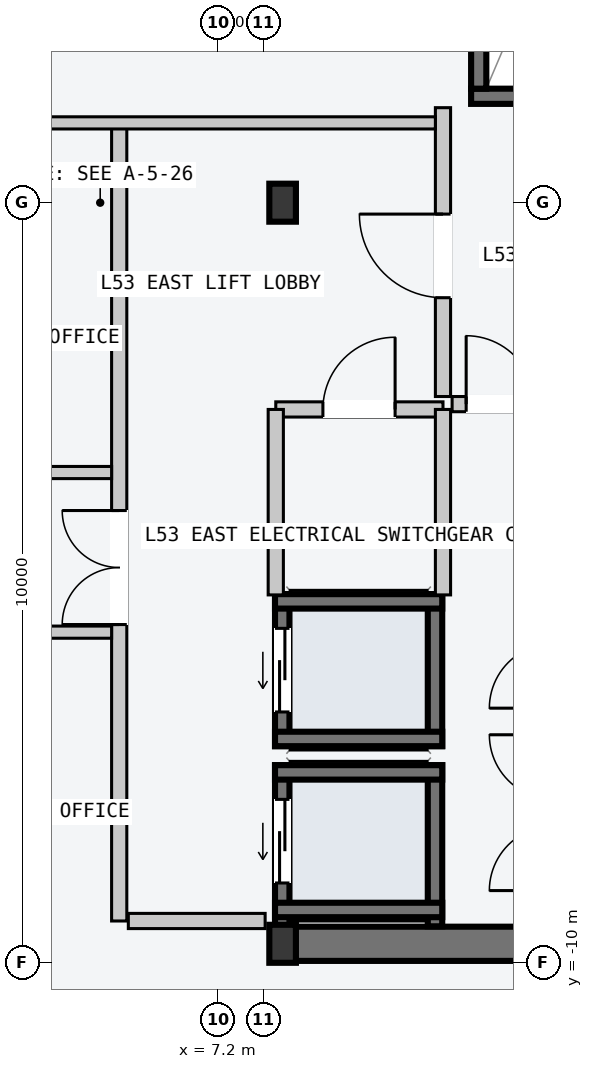
"""IFC4 building model, lengths in metres.
Left out: names, types, materials, properties, quantities, classifications, styles, units other than length and angle.
Written with IfcOpenShell. Run it as: python <this file> out.ifc"""

import sys

from ifc_helpers import new_model, si_unit, direction, frame, frame_2d, origin, origin_2d, place, context, subcontext, project, spatial, rectangle, i_section, extrude, element, fill, save


model = new_model("IFC4")
c1 = context("Model", 3, precision=1e-05, world=origin(), true_north=direction((0.0, 1.0)))
c2 = subcontext(c1, "Body", "Model", "MODEL_VIEW")
j1 = project(units=[si_unit("LENGTHUNIT", "METRE"), si_unit("PLANEANGLEUNIT", "RADIAN")], contexts=[c1])
p1 = place(None, origin())
s1 = spatial("IfcSite", under=j1, at=p1, CompositionType="ELEMENT")
p2 = place(p1, origin())
s2 = spatial("IfcBuilding", under=s1, at=p2, CompositionType="ELEMENT")
p3 = place(p2, frame((0.0, 0.0, 201.9)))
s3 = spatial("IfcBuildingStorey", under=s2, at=p3, CompositionType="ELEMENT", Elevation=201.9)
p4 = place(p3, frame((8.07, -9.75, -0.2), z_axis=(0.0, 0.0, 1.0), x_axis=(1.0, 0.0, 0.0)))
e1 = element("IfcWall", 1, at=p4, inside=s3, PredefinedType="SHEAR", context=c2, shape_type="SweptSolid", body=[
    extrude(rectangle(XDim=6.46, YDim=0.45, at=frame_2d((3.23, 0.0))), origin(), (0.0, 0.0, 1.0), 3.6),
])
p5 = place(p3, frame((10.53, 1.4, -0.2), z_axis=(0.0, 0.0, 1.0), x_axis=(1.0, 0.0, 0.0)))
e2 = element("IfcWall", 2, at=p5, inside=s3, PredefinedType="SOLIDWALL", context=c2, shape_type="SweptSolid", body=[
    extrude(rectangle(XDim=3.72, YDim=0.2, at=frame_2d((1.86, 0.0))), origin(), (0.0, 0.0, 1.0), 3.6),
])
p6 = place(p5, frame((1.5, 0.0, 0.2)))
e3 = element("IfcOpeningElement", 3, at=p6, cuts=e2, PredefinedType="OPENING", context=c2, shape_type="SweptSolid", body=[
    extrude(rectangle(XDim=1.12, YDim=2.18, at=frame_2d((0.56, 1.09))), frame((0.0, 0.11, 0.0), z_axis=(0.0, -1.0, 0.0), x_axis=(1.0, 0.0, 0.0)), (0.0, 0.0, 1.0), 0.22),
])
p7 = place(p3, frame((10.63, 1.5, -0.2), z_axis=(0.0, 0.0, 1.0), x_axis=(0.0, 1.0, 0.0)))
e4 = element("IfcWall", 4, at=p7, inside=s3, PredefinedType="SOLIDWALL", context=c2, shape_type="SweptSolid", body=[
    extrude(rectangle(XDim=7.8, YDim=0.2, at=frame_2d((3.9, 0.0))), origin(), (0.0, 0.0, 1.0), 3.6),
])
for number, where, z_axis, x_axis in (
    (5, (8.05, -9.75, 0.0), (0.0, 0.0, 1.0), (1.0, 0.0, 0.0)),
    (6, (8.05, 0.0, 0.0), (0.0, 0.0, 1.0), (1.0, 0.0, 0.0)),
):
    element("IfcColumn", number, at=place(p3, frame(where, z_axis=z_axis, x_axis=x_axis)), inside=s3, PredefinedType="COLUMN", context=c2, shape_type="SweptSolid", body=[
        extrude(i_section(OverallWidth=0.35, OverallDepth=0.5, WebThickness=0.02, FlangeThickness=0.032, at=origin_2d()), origin(), (0.0, 0.0, 1.0), 3.6),
    ])
p8 = place(p3, frame((8.045, -9.52, -0.2), z_axis=(0.0, 0.0, 1.0), x_axis=(0.0, 1.0, 0.0)))
e7 = element("IfcWall", 7, at=p8, inside=s3, PredefinedType="SOLIDWALL", context=c2, shape_type="SweptSolid", body=[
    extrude(rectangle(XDim=2.12, YDim=0.19, at=frame_2d((1.06, 0.0))), origin(), (0.0, 0.0, 1.0), 3.6),
])
p9 = place(p8, frame((0.57, 0.0, 0.2)))
e8 = element("IfcOpeningElement", 8, at=p9, cuts=e7, PredefinedType="OPENING", context=c2, shape_type="SweptSolid", body=[
    extrude(rectangle(XDim=1.1, YDim=2.2, at=frame_2d((0.55, 1.1))), frame((0.0, 0.105, 0.0), z_axis=(0.0, -1.0, 0.0), x_axis=(1.0, 0.0, 0.0)), (0.0, 0.0, 1.0), 0.21),
])
p10 = place(p3, frame((10.055, -9.52, -0.2), z_axis=(0.0, 0.0, 1.0), x_axis=(0.0, 1.0, 0.0)))
e9 = element("IfcWall", 9, at=p10, inside=s3, PredefinedType="SOLIDWALL", context=c2, shape_type="SweptSolid", body=[
    extrude(rectangle(XDim=2.12, YDim=0.19, at=frame_2d((1.06, 0.0))), origin(), (0.0, 0.0, 1.0), 3.6),
])
for number, where, z_axis, x_axis in (
    (10, (7.95, -7.495, -0.2), (0.0, 0.0, 1.0), (1.0, 0.0, 0.0)),
    (11, (7.95, -9.305, -0.2), (0.0, 0.0, 1.0), (1.0, 0.0, 0.0)),
):
    element("IfcWall", number, at=place(p3, frame(where, z_axis=z_axis, x_axis=x_axis)), inside=s3, PredefinedType="SOLIDWALL", context=c2, shape_type="SweptSolid", body=[
        extrude(rectangle(XDim=2.2, YDim=0.19, at=frame_2d((1.1, 0.0))), origin(), (0.0, 0.0, 1.0), 3.6),
    ])
p11 = place(p3, frame((8.045, -7.15, -0.2), z_axis=(0.0, 0.0, 1.0), x_axis=(0.0, 1.0, 0.0)))
e12 = element("IfcWall", 12, at=p11, inside=s3, PredefinedType="SOLIDWALL", context=c2, shape_type="SweptSolid", body=[
    extrude(rectangle(XDim=2.0, YDim=0.19, at=frame_2d((1.0, 0.0))), origin(), (0.0, 0.0, 1.0), 3.6),
])
p12 = place(p11, frame((0.45, 0.0, 0.2)))
e13 = element("IfcOpeningElement", 13, at=p12, cuts=e12, PredefinedType="OPENING", context=c2, shape_type="SweptSolid", body=[
    extrude(rectangle(XDim=1.1, YDim=2.2, at=frame_2d((0.55, 1.1))), frame((0.0, 0.105, 0.0), z_axis=(0.0, -1.0, 0.0), x_axis=(1.0, 0.0, 0.0)), (0.0, 0.0, 1.0), 0.21),
])
p13 = place(p3, frame((10.055, -7.15, -0.2), z_axis=(0.0, 0.0, 1.0), x_axis=(0.0, 1.0, 0.0)))
e14 = element("IfcWall", 14, at=p13, inside=s3, PredefinedType="SOLIDWALL", context=c2, shape_type="SweptSolid", body=[
    extrude(rectangle(XDim=2.0, YDim=0.19, at=frame_2d((1.0, 0.0))), origin(), (0.0, 0.0, 1.0), 3.6),
])
for number, where, z_axis, x_axis in (
    (15, (7.95, -5.245, -0.2), (0.0, 0.0, 1.0), (1.0, 0.0, 0.0)),
    (16, (7.95, -7.055, -0.2), (0.0, 0.0, 1.0), (1.0, 0.0, 0.0)),
):
    element("IfcWall", number, at=place(p3, frame(where, z_axis=z_axis, x_axis=x_axis)), inside=s3, PredefinedType="SOLIDWALL", context=c2, shape_type="SweptSolid", body=[
        extrude(rectangle(XDim=2.2, YDim=0.19, at=frame_2d((1.1, 0.0))), origin(), (0.0, 0.0, 1.0), 3.6),
    ])
p14 = place(p3, frame((5.9, -9.45, 0.0), z_axis=(0.0, 0.0, 1.0), x_axis=(0.0, 1.0, 0.0)))
e17 = element("IfcWall", 17, at=p14, inside=s3, PredefinedType="PARTITIONING", context=c2, shape_type="SweptSolid", body=[
    extrude(rectangle(XDim=10.5, YDim=0.2, at=frame_2d((5.25, 0.0))), origin(), (0.0, 0.0, 1.0), 3.4),
])
p15 = place(p14, frame((3.9, 0.0, 0.0)))
e18 = element("IfcOpeningElement", 18, at=p15, cuts=e17, PredefinedType="OPENING", context=c2, shape_type="SweptSolid", body=[
    extrude(rectangle(XDim=1.5, YDim=2.2, at=frame_2d((0.75, 1.1))), frame((0.0, 0.11, 0.0), z_axis=(0.0, -1.0, 0.0), x_axis=(1.0, 0.0, 0.0)), (0.0, 0.0, 1.0), 0.22),
])
p16 = place(p3, frame((6.02, -9.45, 0.0), z_axis=(0.0, 0.0, 1.0), x_axis=(1.0, 0.0, 0.0)))
e19 = element("IfcWall", 19, at=p16, inside=s3, PredefinedType="PARTITIONING", context=c2, shape_type="SweptSolid", body=[
    extrude(rectangle(XDim=1.8, YDim=0.2, at=frame_2d((0.9, 0.0))), origin(), (0.0, 0.0, 1.0), 3.4),
])
p17 = place(p3, frame((10.16, -2.55, 0.0), z_axis=(0.0, 0.0, 1.0), x_axis=(0.0, 1.0, 0.0)))
e20 = element("IfcWall", 20, at=p17, inside=s3, PredefinedType="PARTITIONING", context=c2, shape_type="SweptSolid", body=[
    extrude(rectangle(XDim=3.8, YDim=0.2, at=frame_2d((1.9, 0.0))), origin(), (0.0, 0.0, 1.0), 3.4),
])
p18 = place(p17, frame((1.3, 0.0, 0.0)))
e21 = element("IfcOpeningElement", 21, at=p18, cuts=e20, PredefinedType="OPENING", context=c2, shape_type="SweptSolid", body=[
    extrude(rectangle(XDim=1.1, YDim=2.15, at=frame_2d((0.55, 1.075))), frame((0.0, 0.11, 0.0), z_axis=(0.0, -1.0, 0.0), x_axis=(1.0, 0.0, 0.0)), (0.0, 0.0, 1.0), 0.22),
])
p19 = place(p3, frame((10.28, -2.65, 0.0), z_axis=(0.0, 0.0, 1.0), x_axis=(1.0, 0.0, 0.0)))
e22 = element("IfcWall", 22, at=p19, inside=s3, PredefinedType="PARTITIONING", context=c2, shape_type="SweptSolid", body=[
    extrude(rectangle(XDim=1.27, YDim=0.2, at=frame_2d((0.635, 0.0))), origin(), (0.0, 0.0, 1.0), 3.4),
])
p20 = place(p19, frame((0.185, 0.0, 0.0)))
e23 = element("IfcOpeningElement", 23, at=p20, cuts=e22, PredefinedType="OPENING", context=c2, shape_type="SweptSolid", body=[
    extrude(rectangle(XDim=0.9, YDim=2.15, at=frame_2d((0.45, 1.075))), frame((0.0, 0.11, 0.0), z_axis=(0.0, -1.0, 0.0), x_axis=(1.0, 0.0, 0.0)), (0.0, 0.0, 1.0), 0.22),
])
p21 = place(p3, frame((7.96, -2.72, 0.0), z_axis=(0.0, 0.0, 1.0), x_axis=(1.0, 0.0, 0.0)))
e24 = element("IfcWall", 24, at=p21, inside=s3, PredefinedType="PARTITIONING", context=c2, shape_type="SweptSolid", body=[
    extrude(rectangle(XDim=2.2, YDim=0.2, at=frame_2d((1.1, 0.0))), origin(), (0.0, 0.0, 1.0), 3.4),
])
p22 = place(p21, frame((0.62, 0.0, 0.0)))
e25 = element("IfcOpeningElement", 25, at=p22, cuts=e24, PredefinedType="OPENING", context=c2, shape_type="SweptSolid", body=[
    extrude(rectangle(XDim=0.95, YDim=2.1, at=frame_2d((0.475, 1.05))), frame((0.0, 0.11, 0.0), z_axis=(0.0, -1.0, 0.0), x_axis=(1.0, 0.0, 0.0)), (0.0, 0.0, 1.0), 0.22),
])
for number, where, z_axis, x_axis in (
    (26, (7.96, -5.16, 0.0), (0.0, 0.0, 1.0), (0.0, 1.0, 0.0)),
    (27, (10.16, -5.16, 0.0), (0.0, 0.0, 1.0), (0.0, 1.0, 0.0)),
):
    element("IfcWall", number, at=place(p3, frame(where, z_axis=z_axis, x_axis=x_axis)), inside=s3, PredefinedType="PARTITIONING", context=c2, shape_type="SweptSolid", body=[
        extrude(rectangle(XDim=2.44, YDim=0.2, at=frame_2d((1.22, 0.0))), origin(), (0.0, 0.0, 1.0), 3.4),
    ])
p23 = place(p3, frame((1.26, 1.05, 0.0), z_axis=(0.0, 0.0, 1.0), x_axis=(1.0, 0.0, 0.0)))
e28 = element("IfcWall", 28, at=p23, inside=s3, PredefinedType="PARTITIONING", context=c2, shape_type="SweptSolid", body=[
    extrude(rectangle(XDim=8.8, YDim=0.16, at=frame_2d((4.4, 0.0))), origin(), (0.0, 0.0, 1.0), 3.4),
])
for number, where, z_axis, x_axis in (
    (29, (1.26, -3.55, 0.0), (0.0, 0.0, 1.0), (1.0, 0.0, 0.0)),
    (30, (1.26, -5.65, 0.0), (0.0, 0.0, 1.0), (1.0, 0.0, 0.0)),
):
    element("IfcWall", number, at=place(p3, frame(where, z_axis=z_axis, x_axis=x_axis)), inside=s3, PredefinedType="PARTITIONING", context=c2, shape_type="SweptSolid", body=[
        extrude(rectangle(XDim=4.54, YDim=0.16, at=frame_2d((2.27, 0.0))), origin(), (0.0, 0.0, 1.0), 3.4),
    ])
p24 = place(p9, origin())
e31 = element("IfcDoor", 31, at=p24, inside=s3, OperationType="SLIDING_TO_LEFT", PredefinedType="DOOR", context=c2, shape_type="SweptSolid", body=[
    extrude(rectangle(XDim=1.1, YDim=2.2, at=frame_2d((0.55, 1.1))), frame((0.0, 0.025, 0.0), z_axis=(0.0, -1.0, 0.0), x_axis=(1.0, 0.0, 0.0)), (0.0, 0.0, 1.0), 0.05),
])
fill(e8, e31)
p25 = place(p12, origin())
e32 = element("IfcDoor", 32, at=p25, inside=s3, OperationType="SLIDING_TO_LEFT", PredefinedType="DOOR", context=c2, shape_type="SweptSolid", body=[
    extrude(rectangle(XDim=1.1, YDim=2.2, at=frame_2d((0.55, 1.1))), frame((0.0, 0.025, 0.0), z_axis=(0.0, -1.0, 0.0), x_axis=(1.0, 0.0, 0.0)), (0.0, 0.0, 1.0), 0.05),
])
fill(e13, e32)
p26 = place(p15, origin())
e33 = element("IfcDoor", 33, at=p26, inside=s3, OperationType="DOUBLE_DOOR_SINGLE_SWING", PredefinedType="DOOR", context=c2, shape_type="SweptSolid", body=[
    extrude(rectangle(XDim=1.5, YDim=2.2, at=frame_2d((0.75, 1.1))), frame((0.0, 0.025, 0.0), z_axis=(0.0, -1.0, 0.0), x_axis=(1.0, 0.0, 0.0)), (0.0, 0.0, 1.0), 0.05),
])
fill(e18, e33)
p27 = place(p18, origin())
e34 = element("IfcDoor", 34, at=p27, inside=s3, OperationType="SINGLE_SWING_RIGHT", PredefinedType="DOOR", context=c2, shape_type="SweptSolid", body=[
    extrude(rectangle(XDim=1.1, YDim=2.15, at=frame_2d((0.55, 1.075))), frame((0.0, 0.025, 0.0), z_axis=(0.0, -1.0, 0.0), x_axis=(1.0, 0.0, 0.0)), (0.0, 0.0, 1.0), 0.05),
])
fill(e21, e34)
p28 = place(p20, origin())
e35 = element("IfcDoor", 35, at=p28, inside=s3, OperationType="SINGLE_SWING_LEFT", PredefinedType="DOOR", context=c2, shape_type="SweptSolid", body=[
    extrude(rectangle(XDim=0.9, YDim=2.15, at=frame_2d((0.45, 1.075))), frame((0.0, 0.025, 0.0), z_axis=(0.0, -1.0, 0.0), x_axis=(1.0, 0.0, 0.0)), (0.0, 0.0, 1.0), 0.05),
])
fill(e23, e35)
p29 = place(p22, origin())
e36 = element("IfcDoor", 36, at=p29, inside=s3, OperationType="SINGLE_SWING_RIGHT", PredefinedType="DOOR", context=c2, shape_type="SweptSolid", body=[
    extrude(rectangle(XDim=0.95, YDim=2.1, at=frame_2d((0.475, 1.05))), frame((0.0, 0.025, 0.0), z_axis=(0.0, -1.0, 0.0), x_axis=(1.0, 0.0, 0.0)), (0.0, 0.0, 1.0), 0.05),
])
fill(e25, e36)
save(model, sys.argv[1])
